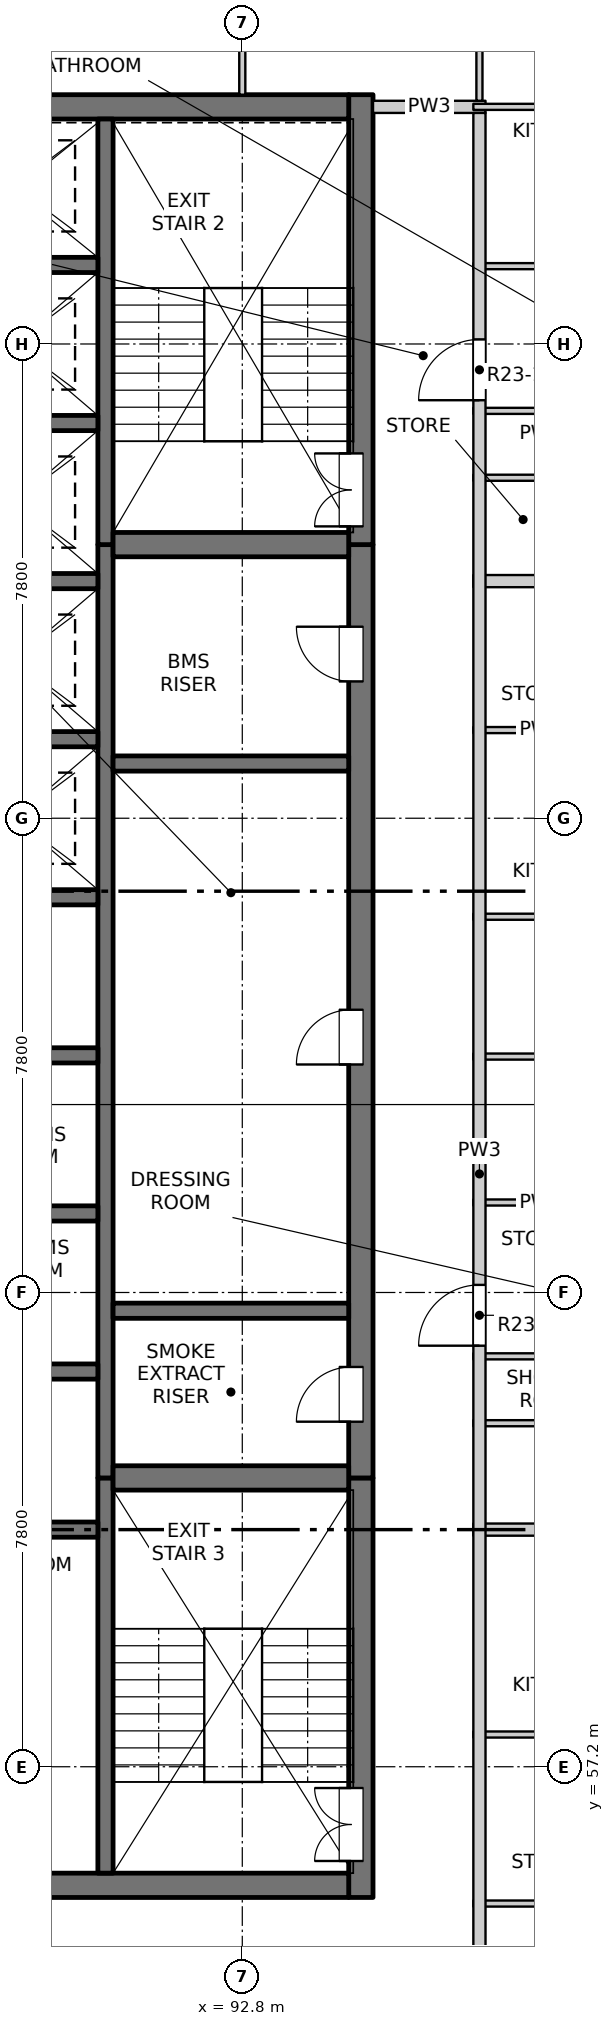
"""IFC4 building model, lengths in metres.
Left out: names, types, materials, properties, quantities, classifications, styles, units other than length and angle.
Written with IfcOpenShell. Run it as: python <this file> out.ifc"""

import sys

from ifc_helpers import new_model, si_unit, direction, frame, frame_2d, origin, place, context, subcontext, project, spatial, rectangle, extrude, element, fill, save


model = new_model("IFC4")
c1 = context("Model", 3, precision=1e-05, world=origin(), true_north=direction((0.0, 1.0)))
c2 = subcontext(c1, "Body", "Model", "MODEL_VIEW")
j1 = project(units=[si_unit("LENGTHUNIT", "METRE"), si_unit("PLANEANGLEUNIT", "RADIAN")], contexts=[c1])
p1 = place(None, origin())
s1 = spatial("IfcSite", under=j1, at=p1, CompositionType="ELEMENT")
p2 = place(p1, origin())
s2 = spatial("IfcBuilding", under=s1, at=p2, CompositionType="ELEMENT")
p3 = place(p2, frame((0.0, 0.0, 234.7)))
s3 = spatial("IfcBuildingStorey", under=s2, at=p3, CompositionType="ELEMENT", Elevation=234.7)
p4 = place(p3, frame((94.75, 55.05, -0.25), z_axis=(0.0, 0.0, 1.0), x_axis=(0.0, 1.0, 0.0)))
e1 = element("IfcWall", 1, at=p4, inside=s3, PredefinedType="SOLIDWALL", context=c2, shape_type="SweptSolid", body=[
    extrude(rectangle(XDim=6.9, YDim=0.4, at=frame_2d((3.45, 0.0))), origin(), (0.0, 0.0, 1.0), 3.4),
])
p5 = place(p4, frame((0.6, 0.0, 0.25)))
e2 = element("IfcOpeningElement", 2, at=p5, cuts=e1, PredefinedType="OPENING", context=c2, shape_type="SweptSolid", body=[
    extrude(rectangle(XDim=1.2, YDim=2.1, at=frame_2d((0.6, 1.05))), frame((0.0, 0.21, 0.0), z_axis=(0.0, -1.0, 0.0), x_axis=(1.0, 0.0, 0.0)), (0.0, 0.0, 1.0), 0.42),
])
p6 = place(p3, frame((94.75, 61.95, -0.25), z_axis=(0.0, 0.0, 1.0), x_axis=(0.0, 1.0, 0.0)))
e3 = element("IfcWall", 3, at=p6, inside=s3, PredefinedType="SOLIDWALL", context=c2, shape_type="SweptSolid", body=[
    extrude(rectangle(XDim=15.35, YDim=0.4, at=frame_2d((7.675, 0.0))), origin(), (0.0, 0.0, 1.0), 3.4),
])
p7 = place(p6, frame((0.925, 0.0, 0.25)))
e4 = element("IfcOpeningElement", 4, at=p7, cuts=e3, PredefinedType="OPENING", context=c2, shape_type="SweptSolid", body=[
    extrude(rectangle(XDim=0.9, YDim=2.1, at=frame_2d((0.45, 1.05))), frame((0.0, 0.21, 0.0), z_axis=(0.0, -1.0, 0.0), x_axis=(1.0, 0.0, 0.0)), (0.0, 0.0, 1.0), 0.42),
])
p8 = place(p6, frame((6.8, 0.0, 0.25)))
e5 = element("IfcOpeningElement", 5, at=p8, cuts=e3, PredefinedType="OPENING", context=c2, shape_type="SweptSolid", body=[
    extrude(rectangle(XDim=0.9, YDim=2.1, at=frame_2d((0.45, 1.05))), frame((0.0, 0.21, 0.0), z_axis=(0.0, -1.0, 0.0), x_axis=(1.0, 0.0, 0.0)), (0.0, 0.0, 1.0), 0.42),
])
p9 = place(p6, frame((13.1, 0.0, 0.25)))
e6 = element("IfcOpeningElement", 6, at=p9, cuts=e3, PredefinedType="OPENING", context=c2, shape_type="SweptSolid", body=[
    extrude(rectangle(XDim=0.9, YDim=2.1, at=frame_2d((0.45, 1.05))), frame((0.0, 0.21, 0.0), z_axis=(0.0, -1.0, 0.0), x_axis=(1.0, 0.0, 0.0)), (0.0, 0.0, 1.0), 0.42),
])
p10 = place(p3, frame((94.75, 77.3, -0.25), z_axis=(0.0, 0.0, 1.0), x_axis=(0.0, 1.0, 0.0)))
e7 = element("IfcWall", 7, at=p10, inside=s3, PredefinedType="SOLIDWALL", context=c2, shape_type="SweptSolid", body=[
    extrude(rectangle(XDim=7.4, YDim=0.4, at=frame_2d((3.7, 0.0))), origin(), (0.0, 0.0, 1.0), 3.4),
])
p11 = place(p10, frame((0.3, 0.0, 0.25)))
e8 = element("IfcOpeningElement", 8, at=p11, cuts=e7, PredefinedType="OPENING", context=c2, shape_type="SweptSolid", body=[
    extrude(rectangle(XDim=1.2, YDim=2.1, at=frame_2d((0.6, 1.05))), frame((0.0, 0.21, 0.0), z_axis=(0.0, -1.0, 0.0), x_axis=(1.0, 0.0, 0.0)), (0.0, 0.0, 1.0), 0.42),
])
p12 = place(p3, frame((75.45, 55.25, -0.25), z_axis=(0.0, 0.0, 1.0), x_axis=(1.0, 0.0, 0.0)))
e9 = element("IfcWall", 9, at=p12, inside=s3, PredefinedType="SOLIDWALL", context=c2, shape_type="SweptSolid", body=[
    extrude(rectangle(XDim=19.1, YDim=0.4, at=frame_2d((9.55, 0.0))), origin(), (0.0, 0.0, 1.0), 3.4),
])
p13 = place(p12, frame((8.8, 0.0, 0.25)))
e10 = element("IfcOpeningElement", 10, at=p13, cuts=e9, PredefinedType="OPENING", context=c2, shape_type="SweptSolid", body=[
    extrude(rectangle(XDim=1.5, YDim=2.1, at=frame_2d((0.75, 1.05))), frame((0.0, 0.21, 0.0), z_axis=(0.0, -1.0, 0.0), x_axis=(1.0, 0.0, 0.0)), (0.0, 0.0, 1.0), 0.42),
])
p14 = place(p3, frame((75.45, 84.5, -0.25), z_axis=(0.0, 0.0, 1.0), x_axis=(1.0, 0.0, 0.0)))
e11 = element("IfcWall", 11, at=p14, inside=s3, PredefinedType="SOLIDWALL", context=c2, shape_type="SweptSolid", body=[
    extrude(rectangle(XDim=19.1, YDim=0.4, at=frame_2d((9.55, 0.0))), origin(), (0.0, 0.0, 1.0), 3.4),
])
p15 = place(p3, frame((90.55, 55.45, -0.25), z_axis=(0.0, 0.0, 1.0), x_axis=(0.0, 1.0, 0.0)))
e12 = element("IfcWall", 12, at=p15, inside=s3, PredefinedType="SOLIDWALL", context=c2, shape_type="SweptSolid", body=[
    extrude(rectangle(XDim=6.5, YDim=0.25, at=frame_2d((3.25, 0.0))), origin(), (0.0, 0.0, 1.0), 3.4),
])
p16 = place(p3, frame((90.55, 61.95, -0.25), z_axis=(0.0, 0.0, 1.0), x_axis=(0.0, 1.0, 0.0)))
e13 = element("IfcWall", 13, at=p16, inside=s3, PredefinedType="SOLIDWALL", context=c2, shape_type="SweptSolid", body=[
    extrude(rectangle(XDim=15.35, YDim=0.25, at=frame_2d((7.675, 0.0))), origin(), (0.0, 0.0, 1.0), 3.4),
])
p17 = place(p3, frame((90.55, 77.3, -0.25), z_axis=(0.0, 0.0, 1.0), x_axis=(0.0, 1.0, 0.0)))
e14 = element("IfcWall", 14, at=p17, inside=s3, PredefinedType="SOLIDWALL", context=c2, shape_type="SweptSolid", body=[
    extrude(rectangle(XDim=7.0, YDim=0.25, at=frame_2d((3.5, 0.0))), origin(), (0.0, 0.0, 1.0), 3.4),
])
for number, where, z_axis, x_axis in (
    (15, (87.425, 61.1, -0.25), (0.0, 0.0, 1.0), (1.0, 0.0, 0.0)),
    (16, (87.425, 63.7, -0.25), (0.0, 0.0, 1.0), (1.0, 0.0, 0.0)),
    (17, (87.425, 66.3, -0.25), (0.0, 0.0, 1.0), (1.0, 0.0, 0.0)),
    (18, (87.425, 68.9, -0.25), (0.0, 0.0, 1.0), (1.0, 0.0, 0.0)),
    (19, (87.425, 71.5, -0.25), (0.0, 0.0, 1.0), (1.0, 0.0, 0.0)),
    (20, (87.425, 74.1, -0.25), (0.0, 0.0, 1.0), (1.0, 0.0, 0.0)),
    (21, (87.425, 76.7, -0.25), (0.0, 0.0, 1.0), (1.0, 0.0, 0.0)),
    (22, (87.425, 79.3, -0.25), (0.0, 0.0, 1.0), (1.0, 0.0, 0.0)),
    (23, (87.425, 81.9, -0.25), (0.0, 0.0, 1.0), (1.0, 0.0, 0.0)),
):
    element("IfcWall", number, at=place(p3, frame(where, z_axis=z_axis, x_axis=x_axis)), inside=s3, PredefinedType="SOLIDWALL", context=c2, shape_type="SweptSolid", body=[
        extrude(rectangle(XDim=3.0, YDim=0.25, at=frame_2d((1.5, 0.0))), origin(), (0.0, 0.0, 1.0), 3.4),
    ])
p18 = place(p3, frame((90.675, 61.95, -0.25), z_axis=(0.0, 0.0, 1.0), x_axis=(1.0, 0.0, 0.0)))
e24 = element("IfcWall", 24, at=p18, inside=s3, PredefinedType="SOLIDWALL", context=c2, shape_type="SweptSolid", body=[
    extrude(rectangle(XDim=3.875, YDim=0.4, at=frame_2d((1.938, 0.0))), origin(), (0.0, 0.0, 1.0), 3.4),
])
for number, where, z_axis, x_axis in (
    (25, (90.675, 64.7, -0.25), (0.0, 0.0, 1.0), (1.0, 0.0, 0.0)),
    (26, (90.675, 73.7, -0.25), (0.0, 0.0, 1.0), (1.0, 0.0, 0.0)),
):
    element("IfcWall", number, at=place(p3, frame(where, z_axis=z_axis, x_axis=x_axis)), inside=s3, PredefinedType="SOLIDWALL", context=c2, shape_type="SweptSolid", body=[
        extrude(rectangle(XDim=3.875, YDim=0.25, at=frame_2d((1.938, 0.0))), origin(), (0.0, 0.0, 1.0), 3.4),
    ])
p19 = place(p3, frame((90.675, 77.3, -0.25), z_axis=(0.0, 0.0, 1.0), x_axis=(1.0, 0.0, 0.0)))
e27 = element("IfcWall", 27, at=p19, inside=s3, PredefinedType="SOLIDWALL", context=c2, shape_type="SweptSolid", body=[
    extrude(rectangle(XDim=3.875, YDim=0.4, at=frame_2d((1.938, 0.0))), origin(), (0.0, 0.0, 1.0), 3.4),
])
for number, where, z_axis, x_axis in (
    (28, (96.6, 54.95, 0.0), (0.0, 0.0, 1.0), (1.0, 0.0, 0.0)),
    (29, (96.6, 57.73, 0.0), (0.0, 0.0, 1.0), (1.0, 0.0, 0.0)),
):
    element("IfcWall", number, at=place(p3, frame(where, z_axis=z_axis, x_axis=x_axis)), inside=s3, PredefinedType="PARTITIONING", context=c2, shape_type="SweptSolid", body=[
        extrude(rectangle(XDim=2.22, YDim=0.1, at=frame_2d((1.11, 0.0))), origin(), (0.0, 0.0, 1.0), 3.15),
    ])
p20 = place(p3, frame((96.6, 61.1, 0.0), z_axis=(0.0, 0.0, 1.0), x_axis=(1.0, 0.0, 0.0)))
e30 = element("IfcWall", 30, at=p20, inside=s3, PredefinedType="PARTITIONING", context=c2, shape_type="SweptSolid", body=[
    extrude(rectangle(XDim=11.5, YDim=0.2, at=frame_2d((5.75, 0.0))), origin(), (0.0, 0.0, 1.0), 2.55),
])
for number, where, z_axis, x_axis in (
    (31, (96.6, 62.85, 0.0), (0.0, 0.0, 1.0), (1.0, 0.0, 0.0)),
    (32, (96.6, 63.95, 0.0), (0.0, 0.0, 1.0), (1.0, 0.0, 0.0)),
    (33, (96.6, 66.48, 0.0), (0.0, 0.0, 1.0), (1.0, 0.0, 0.0)),
):
    element("IfcWall", number, at=place(p3, frame(where, z_axis=z_axis, x_axis=x_axis)), inside=s3, PredefinedType="PARTITIONING", context=c2, shape_type="SweptSolid", body=[
        extrude(rectangle(XDim=2.22, YDim=0.1, at=frame_2d((1.11, 0.0))), origin(), (0.0, 0.0, 1.0), 3.15),
    ])
p21 = place(p3, frame((96.6, 68.88, 0.0), z_axis=(0.0, 0.0, 1.0), x_axis=(1.0, 0.0, 0.0)))
e34 = element("IfcWall", 34, at=p21, inside=s3, PredefinedType="PARTITIONING", context=c2, shape_type="SweptSolid", body=[
    extrude(rectangle(XDim=2.22, YDim=0.1, at=frame_2d((1.11, 0.0))), origin(), (0.0, 0.0, 1.0), 2.55),
])
for number, where, z_axis, x_axis in (
    (35, (96.6, 71.18, 0.0), (0.0, 0.0, 1.0), (1.0, 0.0, 0.0)),
    (36, (96.6, 74.25, 0.0), (0.0, 0.0, 1.0), (1.0, 0.0, 0.0)),
):
    element("IfcWall", number, at=place(p3, frame(where, z_axis=z_axis, x_axis=x_axis)), inside=s3, PredefinedType="PARTITIONING", context=c2, shape_type="SweptSolid", body=[
        extrude(rectangle(XDim=2.22, YDim=0.1, at=frame_2d((1.11, 0.0))), origin(), (0.0, 0.0, 1.0), 3.15),
    ])
p22 = place(p3, frame((96.6, 76.7, 0.0), z_axis=(0.0, 0.0, 1.0), x_axis=(1.0, 0.0, 0.0)))
e37 = element("IfcWall", 37, at=p22, inside=s3, PredefinedType="PARTITIONING", context=c2, shape_type="SweptSolid", body=[
    extrude(rectangle(XDim=11.5, YDim=0.2, at=frame_2d((5.75, 0.0))), origin(), (0.0, 0.0, 1.0), 2.55),
])
for number, where, z_axis, x_axis in (
    (38, (96.6, 78.4, 0.0), (0.0, 0.0, 1.0), (1.0, 0.0, 0.0)),
    (39, (96.6, 79.5, 0.0), (0.0, 0.0, 1.0), (1.0, 0.0, 0.0)),
    (40, (96.6, 81.88, 0.0), (0.0, 0.0, 1.0), (1.0, 0.0, 0.0)),
):
    element("IfcWall", number, at=place(p3, frame(where, z_axis=z_axis, x_axis=x_axis)), inside=s3, PredefinedType="PARTITIONING", context=c2, shape_type="SweptSolid", body=[
        extrude(rectangle(XDim=2.22, YDim=0.1, at=frame_2d((1.11, 0.0))), origin(), (0.0, 0.0, 1.0), 3.15),
    ])
p23 = place(p3, frame((94.95, 84.5, 0.0), z_axis=(0.0, 0.0, 1.0), x_axis=(1.0, 0.0, 0.0)))
e41 = element("IfcWall", 41, at=p23, inside=s3, PredefinedType="PARTITIONING", context=c2, shape_type="SweptSolid", body=[
    extrude(rectangle(XDim=1.85, YDim=0.2, at=frame_2d((0.925, 0.0))), origin(), (0.0, 0.0, 1.0), 3.15),
])
p24 = place(p3, frame((96.6, 84.5, 0.0), z_axis=(0.0, 0.0, 1.0), x_axis=(1.0, 0.0, 0.0)))
e42 = element("IfcWall", 42, at=p24, inside=s3, PredefinedType="PARTITIONING", context=c2, shape_type="SweptSolid", body=[
    extrude(rectangle(XDim=11.5, YDim=0.1, at=frame_2d((5.75, 0.0))), origin(), (0.0, 0.0, 1.0), 3.15),
])
p25 = place(p24, frame((2.635, 0.0, 0.0)))
e43 = element("IfcOpeningElement", 43, at=p25, cuts=e42, PredefinedType="OPENING", context=c2, shape_type="SweptSolid", body=[
    extrude(rectangle(XDim=0.9, YDim=2.1, at=frame_2d((0.45, 1.05))), frame((0.0, 0.06, 0.0), z_axis=(0.0, -1.0, 0.0), x_axis=(1.0, 0.0, 0.0)), (0.0, 0.0, 1.0), 0.12),
])
p26 = place(p3, frame((92.8, 84.7, 0.0), z_axis=(0.0, 0.0, 1.0), x_axis=(0.0, 1.0, 0.0)))
e44 = element("IfcWall", 44, at=p26, inside=s3, PredefinedType="PARTITIONING", context=c2, shape_type="SweptSolid", body=[
    extrude(rectangle(XDim=3.4, YDim=0.1, at=frame_2d((1.7, 0.0))), origin(), (0.0, 0.0, 1.0), 3.15),
])
p27 = place(p26, frame((1.3, 0.0, 0.0)))
e45 = element("IfcOpeningElement", 45, at=p27, cuts=e44, PredefinedType="OPENING", context=c2, shape_type="SweptSolid", body=[
    extrude(rectangle(XDim=0.9, YDim=2.1, at=frame_2d((0.45, 1.05))), frame((0.0, 0.06, 0.0), z_axis=(0.0, -1.0, 0.0), x_axis=(1.0, 0.0, 0.0)), (0.0, 0.0, 1.0), 0.12),
])
p28 = place(p3, frame((96.7, 49.5, 0.0), z_axis=(0.0, 0.0, 1.0), x_axis=(0.0, 1.0, 0.0)))
e46 = element("IfcWall", 46, at=p28, inside=s3, PredefinedType="PARTITIONING", context=c2, shape_type="SweptSolid", body=[
    extrude(rectangle(XDim=34.9, YDim=0.2, at=frame_2d((17.45, 0.0))), origin(), (0.0, 0.0, 1.0), 3.15),
])
p29 = place(p28, frame((3.175, 0.0, 0.0)))
e47 = element("IfcOpeningElement", 47, at=p29, cuts=e46, PredefinedType="OPENING", context=c2, shape_type="SweptSolid", body=[
    extrude(rectangle(XDim=1.0, YDim=2.1, at=frame_2d((0.5, 1.05))), frame((0.0, 0.11, 0.0), z_axis=(0.0, -1.0, 0.0), x_axis=(1.0, 0.0, 0.0)), (0.0, 0.0, 1.0), 0.22),
])
p30 = place(p28, frame((14.625, 0.0, 0.0)))
e48 = element("IfcOpeningElement", 48, at=p30, cuts=e46, PredefinedType="OPENING", context=c2, shape_type="SweptSolid", body=[
    extrude(rectangle(XDim=1.0, YDim=2.1, at=frame_2d((0.5, 1.05))), frame((0.0, 0.11, 0.0), z_axis=(0.0, -1.0, 0.0), x_axis=(1.0, 0.0, 0.0)), (0.0, 0.0, 1.0), 0.22),
])
p31 = place(p28, frame((30.175, 0.0, 0.0)))
e49 = element("IfcOpeningElement", 49, at=p31, cuts=e46, PredefinedType="OPENING", context=c2, shape_type="SweptSolid", body=[
    extrude(rectangle(XDim=1.0, YDim=2.1, at=frame_2d((0.5, 1.05))), frame((0.0, 0.11, 0.0), z_axis=(0.0, -1.0, 0.0), x_axis=(1.0, 0.0, 0.0)), (0.0, 0.0, 1.0), 0.22),
])
p32 = place(p3, frame((96.7, 84.6, 0.0), z_axis=(0.0, 0.0, 1.0), x_axis=(0.0, 1.0, 0.0)))
e50 = element("IfcWall", 50, at=p32, inside=s3, PredefinedType="PARTITIONING", context=c2, shape_type="SweptSolid", body=[
    extrude(rectangle(XDim=3.5, YDim=0.1, at=frame_2d((1.75, 0.0))), origin(), (0.0, 0.0, 1.0), 3.15),
])
p33 = place(p32, frame((1.4, 0.0, 0.0)))
e51 = element("IfcOpeningElement", 51, at=p33, cuts=e50, PredefinedType="OPENING", context=c2, shape_type="SweptSolid", body=[
    extrude(rectangle(XDim=0.9, YDim=2.1, at=frame_2d((0.45, 1.05))), frame((0.0, 0.06, 0.0), z_axis=(0.0, -1.0, 0.0), x_axis=(1.0, 0.0, 0.0)), (0.0, 0.0, 1.0), 0.12),
])
p34 = place(p5, origin())
e52 = element("IfcDoor", 52, at=p34, inside=s3, OperationType="DOUBLE_DOOR_SINGLE_SWING", PredefinedType="DOOR", context=c2, shape_type="SweptSolid", body=[
    extrude(rectangle(XDim=1.2, YDim=2.1, at=frame_2d((0.6, 1.05))), frame((0.0, 0.185, 0.0), z_axis=(0.0, -1.0, 0.0), x_axis=(1.0, 0.0, 0.0)), (0.0, 0.0, 1.0), 0.05),
])
fill(e2, e52)
p35 = place(p7, origin())
e53 = element("IfcDoor", 53, at=p35, inside=s3, OperationType="SINGLE_SWING_LEFT", PredefinedType="DOOR", context=c2, shape_type="SweptSolid", body=[
    extrude(rectangle(XDim=0.9, YDim=2.1, at=frame_2d((0.45, 1.05))), frame((0.0, 0.185, 0.0), z_axis=(0.0, -1.0, 0.0), x_axis=(1.0, 0.0, 0.0)), (0.0, 0.0, 1.0), 0.05),
])
fill(e4, e53)
p36 = place(p30, origin())
e54 = element("IfcDoor", 54, at=p36, inside=s3, OperationType="SINGLE_SWING_LEFT", PredefinedType="DOOR", context=c2, shape_type="SweptSolid", body=[
    extrude(rectangle(XDim=1.0, YDim=2.1, at=frame_2d((0.5, 1.05))), frame((0.0, 0.025, 0.0), z_axis=(0.0, -1.0, 0.0), x_axis=(1.0, 0.0, 0.0)), (0.0, 0.0, 1.0), 0.05),
])
fill(e48, e54)
p37 = place(p8, origin())
e55 = element("IfcDoor", 55, at=p37, inside=s3, OperationType="SINGLE_SWING_LEFT", PredefinedType="DOOR", context=c2, shape_type="SweptSolid", body=[
    extrude(rectangle(XDim=0.9, YDim=2.1, at=frame_2d((0.45, 1.05))), frame((0.0, 0.185, 0.0), z_axis=(0.0, -1.0, 0.0), x_axis=(1.0, 0.0, 0.0)), (0.0, 0.0, 1.0), 0.05),
])
fill(e5, e55)
p38 = place(p9, origin())
e56 = element("IfcDoor", 56, at=p38, inside=s3, OperationType="SINGLE_SWING_RIGHT", PredefinedType="DOOR", context=c2, shape_type="SweptSolid", body=[
    extrude(rectangle(XDim=0.9, YDim=2.1, at=frame_2d((0.45, 1.05))), frame((0.0, 0.185, 0.0), z_axis=(0.0, -1.0, 0.0), x_axis=(1.0, 0.0, 0.0)), (0.0, 0.0, 1.0), 0.05),
])
fill(e6, e56)
p39 = place(p11, origin())
e57 = element("IfcDoor", 57, at=p39, inside=s3, OperationType="DOUBLE_DOOR_SINGLE_SWING", PredefinedType="DOOR", context=c2, shape_type="SweptSolid", body=[
    extrude(rectangle(XDim=1.2, YDim=2.1, at=frame_2d((0.6, 1.05))), frame((0.0, 0.185, 0.0), z_axis=(0.0, -1.0, 0.0), x_axis=(1.0, 0.0, 0.0)), (0.0, 0.0, 1.0), 0.05),
])
fill(e8, e57)
p40 = place(p31, origin())
e58 = element("IfcDoor", 58, at=p40, inside=s3, OperationType="SINGLE_SWING_LEFT", PredefinedType="DOOR", context=c2, shape_type="SweptSolid", body=[
    extrude(rectangle(XDim=1.0, YDim=2.1, at=frame_2d((0.5, 1.05))), frame((0.0, 0.025, 0.0), z_axis=(0.0, -1.0, 0.0), x_axis=(1.0, 0.0, 0.0)), (0.0, 0.0, 1.0), 0.05),
])
fill(e49, e58)
save(model, sys.argv[1])
